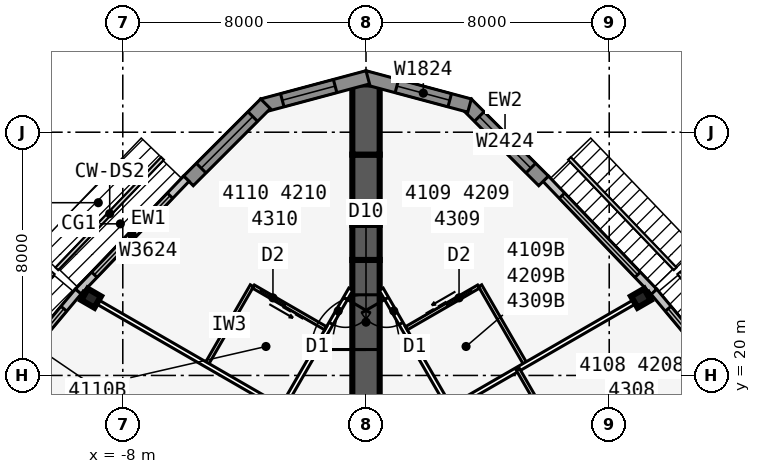
"""IFC4 building model, lengths in metres.
Left out: names, types, materials, properties, quantities, classifications, styles, units other than length and angle.
Written with IfcOpenShell. Run it as: python <this file> out.ifc"""

import sys

from ifc_helpers import new_model, si_unit, direction, frame, frame_2d, origin, origin_2d, place, context, subcontext, project, spatial, polyline, rectangle, i_section, outline, extrude, element, fill, save


model = new_model("IFC4")
c1 = context("Model", 3, precision=1e-05, world=origin(), true_north=direction((0.0, 1.0)))
c2 = subcontext(c1, "Body", "Model", "MODEL_VIEW")
j1 = project(units=[si_unit("LENGTHUNIT", "METRE"), si_unit("PLANEANGLEUNIT", "RADIAN")], contexts=[c1])
p1 = place(None, origin())
s1 = spatial("IfcSite", under=j1, at=p1, CompositionType="ELEMENT")
p2 = place(p1, origin())
s2 = spatial("IfcBuilding", under=s1, at=p2, CompositionType="ELEMENT")
p3 = place(p2, frame((0.0, 0.0, 155.5)))
s3 = spatial("IfcBuildingStorey", under=s2, at=p3, CompositionType="ELEMENT", Elevation=155.5)
p4 = place(p3, frame((0.0, 19.052, 0.0), z_axis=(0.0, 0.0, 1.0), x_axis=(0.0, 1.0, 0.0)))
e1 = element("IfcWall", 1, at=p4, inside=s3, PredefinedType="SHEAR", context=c2, shape_type="SweptSolid", body=[
    extrude(rectangle(XDim=4.746, YDim=0.9, at=frame_2d((2.373, 0.0))), origin(), (0.0, 0.0, 1.0), 3.4),
])
p5 = place(p4, frame((1.8, 0.0, 0.0)))
e2 = element("IfcOpeningElement", 2, at=p5, cuts=e1, PredefinedType="OPENING", context=c2, shape_type="SweptSolid", body=[
    extrude(rectangle(XDim=1.8, YDim=2.13, at=frame_2d((0.9, 1.065))), frame((0.0, 0.46, 0.0), z_axis=(0.0, -1.0, 0.0), x_axis=(1.0, 0.0, 0.0)), (0.0, 0.0, 1.0), 0.92),
])
p6 = place(p3, frame((0.0, 23.799, 0.0), z_axis=(0.0, 0.0, 1.0), x_axis=(0.0, 1.0, 0.0)))
e3 = element("IfcWall", 3, at=p6, inside=s3, PredefinedType="SHEAR", context=c2, shape_type="SweptSolid", body=[
    extrude(rectangle(XDim=1.155, YDim=0.9, at=frame_2d((0.577, 0.0))), origin(), (0.0, 0.0, 1.0), 3.4),
])
p7 = place(p3, frame((0.0, 24.953, 0.0), z_axis=(0.0, 0.0, 1.0), x_axis=(0.0, 1.0, 0.0)))
e4 = element("IfcWall", 4, at=p7, inside=s3, PredefinedType="SHEAR", context=c2, shape_type="SweptSolid", body=[
    extrude(rectangle(XDim=2.309, YDim=0.9, at=frame_2d((1.155, 0.0))), origin(), (0.0, 0.0, 1.0), 3.4),
])
p8 = place(p3, frame((0.0, 27.263, 0.0), z_axis=(0.0, 0.0, 1.0), x_axis=(0.0, 1.0, 0.0)))
e5 = element("IfcWall", 5, at=p8, inside=s3, PredefinedType="SHEAR", context=c2, shape_type="SweptSolid", body=[
    extrude(rectangle(XDim=2.31, YDim=0.9, at=frame_2d((1.155, 0.0))), origin(), (0.0, 0.0, 1.0), 3.4),
])
for number, where, z_axis, x_axis in (
    (6, (9.041, 22.541, 0.0), (0.0, 0.0, 1.0), (-0.5, 0.866, 0.0)),
    (7, (-9.041, 22.541, 0.0), (0.0, 0.0, 1.0), (-0.5, -0.866, 0.0)),
):
    element("IfcColumn", number, at=place(p3, frame(where, z_axis=z_axis, x_axis=x_axis)), inside=s3, PredefinedType="COLUMN", context=c2, shape_type="SweptSolid", body=[
        extrude(i_section(OverallWidth=0.432, OverallDepth=0.498, WebThickness=0.056, FlangeThickness=0.089, at=origin_2d()), origin(), (0.0, 0.0, 1.0), 3.4),
    ])
p9 = place(p3, frame((12.723, 18.868, 0.0), z_axis=(0.0, 0.0, 1.0), x_axis=(-0.641810386606, 0.766863369607, 0.0)))
e8 = element("IfcWall", 8, at=p9, inside=s3, PredefinedType="STANDARD", context=c2, shape_type="SweptSolid", body=[
    extrude(rectangle(XDim=5.076, YDim=0.25, at=frame_2d((2.538, 0.0))), origin(), (0.0, 0.0, 1.0), 3.235),
])
p10 = place(p9, frame((0.738, 0.0, 0.45)))
e9 = element("IfcOpeningElement", 9, at=p10, cuts=e8, PredefinedType="OPENING", context=c2, shape_type="SweptSolid", body=[
    extrude(rectangle(XDim=3.6, YDim=2.4, at=frame_2d((1.8, 1.2))), frame((0.0, 0.135, 0.0), z_axis=(0.0, -1.0, 0.0), x_axis=(1.0, 0.0, 0.0)), (0.0, 0.0, 1.0), 0.27),
])
p11 = place(p3, frame((9.471, 22.754, 0.0), z_axis=(0.0, 0.0, 1.0), x_axis=(-0.691719937936, 0.722165858693, 0.0)))
e10 = element("IfcWall", 10, at=p11, inside=s3, PredefinedType="STANDARD", context=c2, shape_type="SweptSolid", body=[
    extrude(rectangle(XDim=5.148, YDim=0.25, at=frame_2d((2.574, 0.0))), origin(), (0.0, 0.0, 1.0), 3.235),
])
p12 = place(p11, frame((0.774, 0.0, 0.45)))
e11 = element("IfcOpeningElement", 11, at=p12, cuts=e10, PredefinedType="OPENING", context=c2, shape_type="SweptSolid", body=[
    extrude(rectangle(XDim=3.6, YDim=2.4, at=frame_2d((1.8, 1.2))), frame((0.0, 0.135, 0.0), z_axis=(0.0, -1.0, 0.0), x_axis=(1.0, 0.0, 0.0)), (0.0, 0.0, 1.0), 0.27),
])
p13 = place(p3, frame((5.841, 26.399, 0.0), z_axis=(0.0, 0.0, 1.0), x_axis=(-0.707106781187, 0.707106781187, 0.0)))
e12 = element("IfcWall", 12, at=p13, inside=s3, PredefinedType="SOLIDWALL", context=c2, shape_type="SweptSolid", body=[
    extrude(rectangle(XDim=3.586, YDim=0.45, at=frame_2d((1.793, 0.0))), origin(), (0.0, 0.0, 1.0), 3.235),
])
p14 = place(p13, frame((0.593, 0.0, 0.45)))
e13 = element("IfcOpeningElement", 13, at=p14, cuts=e12, PredefinedType="OPENING", context=c2, shape_type="SweptSolid", body=[
    extrude(rectangle(XDim=2.4, YDim=2.4, at=frame_2d((1.2, 1.2))), frame((0.0, 0.235, 0.0), z_axis=(0.0, -1.0, 0.0), x_axis=(1.0, 0.0, 0.0)), (0.0, 0.0, 1.0), 0.47),
])
p15 = place(p3, frame((3.406, 28.877, 0.0), z_axis=(0.0, 0.0, 1.0), x_axis=(-0.965924653531, 0.258823421857, 0.0)))
e14 = element("IfcWall", 14, at=p15, inside=s3, PredefinedType="SOLIDWALL", context=c2, shape_type="SweptSolid", body=[
    extrude(outline(polyline([(3.586, 0.225), (3.527, 0.225), (3.035, 0.093), (3.0, 0.225), (0.0, 0.225), (0.0, -0.225), (3.586, -0.225), (3.586, 0.225)])), origin(), (0.0, 0.0, 1.0), 3.235),
])
p16 = place(p15, frame((0.675, 0.0, 0.45)))
e15 = element("IfcOpeningElement", 15, at=p16, cuts=e14, PredefinedType="OPENING", context=c2, shape_type="SweptSolid", body=[
    extrude(rectangle(XDim=1.8, YDim=2.4, at=frame_2d((0.9, 1.2))), frame((0.0, 0.235, 0.0), z_axis=(0.0, -1.0, 0.0), x_axis=(1.0, 0.0, 0.0)), (0.0, 0.0, 1.0), 0.47),
])
p17 = place(p3, frame((0.058, 29.805, 0.0), z_axis=(0.0, 0.0, 1.0), x_axis=(-0.965924653531, -0.258823421857, 0.0)))
e16 = element("IfcWall", 16, at=p17, inside=s3, PredefinedType="SOLIDWALL", context=c2, shape_type="SweptSolid", body=[
    extrude(outline(polyline([(3.586, 0.225), (0.586, 0.225), (0.551, 0.093), (0.06, 0.225), (0.0, 0.225), (0.0, -0.225), (3.586, -0.225), (3.586, 0.225)])), origin(), (0.0, 0.0, 1.0), 3.235),
])
p18 = place(p17, frame((1.111, 0.0, 0.45)))
e17 = element("IfcOpeningElement", 17, at=p18, cuts=e16, PredefinedType="OPENING", context=c2, shape_type="SweptSolid", body=[
    extrude(rectangle(XDim=1.8, YDim=2.4, at=frame_2d((0.9, 1.2))), frame((0.0, 0.235, 0.0), z_axis=(0.0, -1.0, 0.0), x_axis=(1.0, 0.0, 0.0)), (0.0, 0.0, 1.0), 0.47),
])
p19 = place(p3, frame((-3.305, 28.935, 0.0), z_axis=(0.0, 0.0, 1.0), x_axis=(-0.707106781187, -0.707106781187, 0.0)))
e18 = element("IfcWall", 18, at=p19, inside=s3, PredefinedType="SOLIDWALL", context=c2, shape_type="SweptSolid", body=[
    extrude(rectangle(XDim=3.586, YDim=0.45, at=frame_2d((1.793, 0.0))), origin(), (0.0, 0.0, 1.0), 3.235),
])
p20 = place(p19, frame((0.593, 0.0, 0.45)))
e19 = element("IfcOpeningElement", 19, at=p20, cuts=e18, PredefinedType="OPENING", context=c2, shape_type="SweptSolid", body=[
    extrude(rectangle(XDim=2.4, YDim=2.4, at=frame_2d((1.2, 1.2))), frame((0.0, 0.235, 0.0), z_axis=(0.0, -1.0, 0.0), x_axis=(1.0, 0.0, 0.0)), (0.0, 0.0, 1.0), 0.47),
])
p21 = place(p3, frame((-5.91, 26.472, 0.0), z_axis=(0.0, 0.0, 1.0), x_axis=(-0.691719937936, -0.722165858693, 0.0)))
e20 = element("IfcWall", 20, at=p21, inside=s3, PredefinedType="STANDARD", context=c2, shape_type="SweptSolid", body=[
    extrude(rectangle(XDim=5.148, YDim=0.25, at=frame_2d((2.574, 0.0))), origin(), (0.0, 0.0, 1.0), 3.235),
])
p22 = place(p21, frame((0.774, 0.0, 0.45)))
e21 = element("IfcOpeningElement", 21, at=p22, cuts=e20, PredefinedType="OPENING", context=c2, shape_type="SweptSolid", body=[
    extrude(rectangle(XDim=3.6, YDim=2.4, at=frame_2d((1.8, 1.2))), frame((0.0, 0.135, 0.0), z_axis=(0.0, -1.0, 0.0), x_axis=(1.0, 0.0, 0.0)), (0.0, 0.0, 1.0), 0.27),
])
p23 = place(p3, frame((-9.465, 22.76, 0.0), z_axis=(0.0, 0.0, 1.0), x_axis=(-0.641810386606, -0.766863369607, 0.0)))
e22 = element("IfcWall", 22, at=p23, inside=s3, PredefinedType="STANDARD", context=c2, shape_type="SweptSolid", body=[
    extrude(rectangle(XDim=5.076, YDim=0.25, at=frame_2d((2.538, 0.0))), origin(), (0.0, 0.0, 1.0), 3.235),
])
p24 = place(p23, frame((0.738, 0.0, 0.45)))
e23 = element("IfcOpeningElement", 23, at=p24, cuts=e22, PredefinedType="OPENING", context=c2, shape_type="SweptSolid", body=[
    extrude(rectangle(XDim=3.6, YDim=2.4, at=frame_2d((1.8, 1.2))), frame((0.0, 0.135, 0.0), z_axis=(0.0, -1.0, 0.0), x_axis=(1.0, 0.0, 0.0)), (0.0, 0.0, 1.0), 0.27),
])
p25 = place(p3, frame((20.027, -10.985, 0.0), z_axis=(0.0, 0.0, 1.0), x_axis=(-0.500001677587, 0.866024435227, 0.0)))
e24 = element("IfcWall", 24, at=p25, inside=s3, PredefinedType="PARTITIONING", context=c2, shape_type="SweptSolid", body=[
    extrude(rectangle(XDim=39.054, YDim=0.15, at=frame_2d((19.527, 0.0))), origin(), (0.0, 0.0, 1.0), 3.235),
])
p26 = place(p25, frame((1.558, 0.0, 0.0)))
e25 = element("IfcOpeningElement", 25, at=p26, cuts=e24, PredefinedType="OPENING", context=c2, shape_type="SweptSolid", body=[
    extrude(rectangle(XDim=0.95, YDim=2.13, at=frame_2d((0.475, 1.065))), frame((0.0, 0.085, 0.0), z_axis=(0.0, -1.0, 0.0), x_axis=(1.0, 0.0, 0.0)), (0.0, 0.0, 1.0), 0.17),
])
p27 = place(p25, frame((15.352, 0.0, 0.0)))
e26 = element("IfcOpeningElement", 26, at=p27, cuts=e24, PredefinedType="OPENING", context=c2, shape_type="SweptSolid", body=[
    extrude(rectangle(XDim=0.95, YDim=2.13, at=frame_2d((0.475, 1.065))), frame((0.0, 0.085, 0.0), z_axis=(0.0, -1.0, 0.0), x_axis=(1.0, 0.0, 0.0)), (0.0, 0.0, 1.0), 0.17),
])
p28 = place(p25, frame((22.752, 0.0, 0.0)))
e27 = element("IfcOpeningElement", 27, at=p28, cuts=e24, PredefinedType="OPENING", context=c2, shape_type="SweptSolid", body=[
    extrude(rectangle(XDim=0.95, YDim=2.13, at=frame_2d((0.475, 1.065))), frame((0.0, 0.085, 0.0), z_axis=(0.0, -1.0, 0.0), x_axis=(1.0, 0.0, 0.0)), (0.0, 0.0, 1.0), 0.17),
])
p29 = place(p25, frame((30.952, 0.0, 0.0)))
e28 = element("IfcOpeningElement", 28, at=p29, cuts=e24, PredefinedType="OPENING", context=c2, shape_type="SweptSolid", body=[
    extrude(rectangle(XDim=0.95, YDim=2.13, at=frame_2d((0.475, 1.065))), frame((0.0, 0.085, 0.0), z_axis=(0.0, -1.0, 0.0), x_axis=(1.0, 0.0, 0.0)), (0.0, 0.0, 1.0), 0.17),
])
p30 = place(p25, frame((37.752, 0.0, 0.0)))
e29 = element("IfcOpeningElement", 29, at=p30, cuts=e24, PredefinedType="OPENING", context=c2, shape_type="SweptSolid", body=[
    extrude(rectangle(XDim=0.95, YDim=2.13, at=frame_2d((0.475, 1.065))), frame((0.0, 0.085, 0.0), z_axis=(0.0, -1.0, 0.0), x_axis=(1.0, 0.0, 0.0)), (0.0, 0.0, 1.0), 0.17),
])
p31 = place(p3, frame((2.829, 18.954, 0.0), z_axis=(0.0, 0.0, 1.0), x_axis=(0.866015739374, 0.500016738876, 0.0)))
e30 = element("IfcWall", 30, at=p31, inside=s3, PredefinedType="PARTITIONING", context=c2, shape_type="SweptSolid", body=[
    extrude(rectangle(XDim=7.516, YDim=0.15, at=frame_2d((3.758, 0.0))), origin(), (0.0, 0.0, 1.0), 2.389),
])
p32 = place(p3, frame((6.194, 18.125, 0.0), z_axis=(0.0, 0.0, 1.0), x_axis=(-0.500033551112, 0.866006032174, 0.0)))
e31 = element("IfcWall", 31, at=p32, inside=s3, PredefinedType="PLUMBINGWALL", context=c2, shape_type="SweptSolid", body=[
    extrude(rectangle(XDim=2.4, YDim=0.12, at=frame_2d((1.2, 0.0))), origin(), (0.0, 0.0, 1.0), 3.235),
])
p33 = place(p3, frame((5.253, 20.354, 0.0), z_axis=(0.0, 0.0, 1.0), x_axis=(-0.499990139034, 0.866031096941, 0.0)))
e32 = element("IfcWall", 32, at=p33, inside=s3, PredefinedType="PLUMBINGWALL", context=c2, shape_type="SweptSolid", body=[
    extrude(rectangle(XDim=3.0, YDim=0.12, at=frame_2d((1.5, 0.0))), origin(), (0.0, 0.0, 1.0), 3.235),
])
p34 = place(p3, frame((1.329, 21.552, 0.0), z_axis=(0.0, 0.0, 1.0), x_axis=(0.865997131366, 0.500048966069, 0.0)))
e33 = element("IfcWall", 33, at=p34, inside=s3, PredefinedType="PLUMBINGWALL", context=c2, shape_type="SweptSolid", body=[
    extrude(rectangle(XDim=2.74, YDim=0.12, at=frame_2d((1.37, 0.0))), origin(), (0.0, 0.0, 1.0), 3.235),
])
p35 = place(p34, frame((1.55, 0.0, 0.0)))
e34 = element("IfcOpeningElement", 34, at=p35, cuts=e33, PredefinedType="OPENING", context=c2, shape_type="SweptSolid", body=[
    extrude(rectangle(XDim=0.9, YDim=2.13, at=frame_2d((0.45, 1.065))), frame((0.0, 0.07, 0.0), z_axis=(0.0, -1.0, 0.0), x_axis=(1.0, 0.0, 0.0)), (0.0, 0.0, 1.0), 0.14),
])
p36 = place(p3, frame((-0.5, 22.836, 0.0), z_axis=(0.0, 0.0, 1.0), x_axis=(-0.500001677587, -0.866024435227, 0.0)))
e35 = element("IfcWall", 35, at=p36, inside=s3, PredefinedType="PARTITIONING", context=c2, shape_type="SweptSolid", body=[
    extrude(rectangle(XDim=39.054, YDim=0.15, at=frame_2d((19.527, 0.0))), origin(), (0.0, 0.0, 1.0), 3.235),
])
p37 = place(p36, frame((0.352, 0.0, 0.0)))
e36 = element("IfcOpeningElement", 36, at=p37, cuts=e35, PredefinedType="OPENING", context=c2, shape_type="SweptSolid", body=[
    extrude(rectangle(XDim=0.95, YDim=2.13, at=frame_2d((0.475, 1.065))), frame((0.0, 0.085, 0.0), z_axis=(0.0, -1.0, 0.0), x_axis=(1.0, 0.0, 0.0)), (0.0, 0.0, 1.0), 0.17),
])
p38 = place(p36, frame((5.952, 0.0, 0.0)))
e37 = element("IfcOpeningElement", 37, at=p38, cuts=e35, PredefinedType="OPENING", context=c2, shape_type="SweptSolid", body=[
    extrude(rectangle(XDim=0.95, YDim=2.13, at=frame_2d((0.475, 1.065))), frame((0.0, 0.085, 0.0), z_axis=(0.0, -1.0, 0.0), x_axis=(1.0, 0.0, 0.0)), (0.0, 0.0, 1.0), 0.17),
])
p39 = place(p36, frame((12.752, 0.0, 0.0)))
e38 = element("IfcOpeningElement", 38, at=p39, cuts=e35, PredefinedType="OPENING", context=c2, shape_type="SweptSolid", body=[
    extrude(rectangle(XDim=0.95, YDim=2.13, at=frame_2d((0.475, 1.065))), frame((0.0, 0.085, 0.0), z_axis=(0.0, -1.0, 0.0), x_axis=(1.0, 0.0, 0.0)), (0.0, 0.0, 1.0), 0.17),
])
p40 = place(p36, frame((25.352, 0.0, 0.0)))
e39 = element("IfcOpeningElement", 39, at=p40, cuts=e35, PredefinedType="OPENING", context=c2, shape_type="SweptSolid", body=[
    extrude(rectangle(XDim=0.95, YDim=2.13, at=frame_2d((0.475, 1.065))), frame((0.0, 0.085, 0.0), z_axis=(0.0, -1.0, 0.0), x_axis=(1.0, 0.0, 0.0)), (0.0, 0.0, 1.0), 0.17),
])
p41 = place(p36, frame((32.152, 0.0, 0.0)))
e40 = element("IfcOpeningElement", 40, at=p41, cuts=e35, PredefinedType="OPENING", context=c2, shape_type="SweptSolid", body=[
    extrude(rectangle(XDim=0.95, YDim=2.13, at=frame_2d((0.475, 1.065))), frame((0.0, 0.085, 0.0), z_axis=(0.0, -1.0, 0.0), x_axis=(1.0, 0.0, 0.0)), (0.0, 0.0, 1.0), 0.17),
])
p42 = place(p36, frame((37.752, 0.0, 0.0)))
e41 = element("IfcOpeningElement", 41, at=p42, cuts=e35, PredefinedType="OPENING", context=c2, shape_type="SweptSolid", body=[
    extrude(rectangle(XDim=0.95, YDim=2.13, at=frame_2d((0.475, 1.065))), frame((0.0, 0.085, 0.0), z_axis=(0.0, -1.0, 0.0), x_axis=(1.0, 0.0, 0.0)), (0.0, 0.0, 1.0), 0.17),
])
p43 = place(p3, frame((-2.829, 18.954, 0.0), z_axis=(0.0, 0.0, 1.0), x_axis=(-0.866015739374, 0.500016738876, 0.0)))
e42 = element("IfcWall", 42, at=p43, inside=s3, PredefinedType="PARTITIONING", context=c2, shape_type="SweptSolid", body=[
    extrude(rectangle(XDim=7.516, YDim=0.15, at=frame_2d((3.758, 0.0))), origin(), (0.0, 0.0, 1.0), 2.389),
])
p44 = place(p3, frame((-3.753, 22.952, 0.0), z_axis=(0.0, 0.0, 1.0), x_axis=(-0.499990139034, -0.866031096941, 0.0)))
e43 = element("IfcWall", 43, at=p44, inside=s3, PredefinedType="PLUMBINGWALL", context=c2, shape_type="SweptSolid", body=[
    extrude(rectangle(XDim=3.0, YDim=0.12, at=frame_2d((1.5, 0.0))), origin(), (0.0, 0.0, 1.0), 3.235),
])
p45 = place(p3, frame((-1.329, 21.552, 0.0), z_axis=(0.0, 0.0, 1.0), x_axis=(-0.865997131366, 0.500048966069, 0.0)))
e44 = element("IfcWall", 44, at=p45, inside=s3, PredefinedType="PLUMBINGWALL", context=c2, shape_type="SweptSolid", body=[
    extrude(rectangle(XDim=2.74, YDim=0.12, at=frame_2d((1.37, 0.0))), origin(), (0.0, 0.0, 1.0), 3.235),
])
p46 = place(p45, frame((1.55, 0.0, 0.0)))
e45 = element("IfcOpeningElement", 45, at=p46, cuts=e44, PredefinedType="OPENING", context=c2, shape_type="SweptSolid", body=[
    extrude(rectangle(XDim=0.9, YDim=2.13, at=frame_2d((0.45, 1.065))), frame((0.0, 0.07, 0.0), z_axis=(0.0, -1.0, 0.0), x_axis=(1.0, 0.0, 0.0)), (0.0, 0.0, 1.0), 0.14),
])
p47 = place(p10, origin())
e46 = element("IfcWindow", 46, at=p47, inside=s3, PartitioningType="SINGLE_PANEL", PredefinedType="WINDOW", context=c2, shape_type="SweptSolid", body=[
    extrude(rectangle(XDim=3.6, YDim=2.4, at=frame_2d((1.8, 1.2))), frame((0.0, 0.03, 0.0), z_axis=(0.0, -1.0, 0.0), x_axis=(1.0, 0.0, 0.0)), (0.0, 0.0, 1.0), 0.06),
])
fill(e9, e46)
p48 = place(p12, origin())
e47 = element("IfcWindow", 47, at=p48, inside=s3, PartitioningType="SINGLE_PANEL", PredefinedType="WINDOW", context=c2, shape_type="SweptSolid", body=[
    extrude(rectangle(XDim=3.6, YDim=2.4, at=frame_2d((1.8, 1.2))), frame((0.0, 0.03, 0.0), z_axis=(0.0, -1.0, 0.0), x_axis=(1.0, 0.0, 0.0)), (0.0, 0.0, 1.0), 0.06),
])
fill(e11, e47)
p49 = place(p14, origin())
e48 = element("IfcWindow", 48, at=p49, inside=s3, PartitioningType="SINGLE_PANEL", PredefinedType="WINDOW", context=c2, shape_type="SweptSolid", body=[
    extrude(rectangle(XDim=2.4, YDim=2.4, at=frame_2d((1.2, 1.2))), frame((0.0, 0.03, 0.0), z_axis=(0.0, -1.0, 0.0), x_axis=(1.0, 0.0, 0.0)), (0.0, 0.0, 1.0), 0.06),
])
fill(e13, e48)
p50 = place(p16, origin())
e49 = element("IfcWindow", 49, at=p50, inside=s3, PartitioningType="SINGLE_PANEL", PredefinedType="WINDOW", context=c2, shape_type="SweptSolid", body=[
    extrude(rectangle(XDim=1.8, YDim=2.4, at=frame_2d((0.9, 1.2))), frame((0.0, 0.03, 0.0), z_axis=(0.0, -1.0, 0.0), x_axis=(1.0, 0.0, 0.0)), (0.0, 0.0, 1.0), 0.06),
])
fill(e15, e49)
p51 = place(p18, origin())
e50 = element("IfcWindow", 50, at=p51, inside=s3, PartitioningType="SINGLE_PANEL", PredefinedType="WINDOW", context=c2, shape_type="SweptSolid", body=[
    extrude(rectangle(XDim=1.8, YDim=2.4, at=frame_2d((0.9, 1.2))), frame((0.0, 0.03, 0.0), z_axis=(0.0, -1.0, 0.0), x_axis=(1.0, 0.0, 0.0)), (0.0, 0.0, 1.0), 0.06),
])
fill(e17, e50)
p52 = place(p20, origin())
e51 = element("IfcWindow", 51, at=p52, inside=s3, PartitioningType="SINGLE_PANEL", PredefinedType="WINDOW", context=c2, shape_type="SweptSolid", body=[
    extrude(rectangle(XDim=2.4, YDim=2.4, at=frame_2d((1.2, 1.2))), frame((0.0, 0.03, 0.0), z_axis=(0.0, -1.0, 0.0), x_axis=(1.0, 0.0, 0.0)), (0.0, 0.0, 1.0), 0.06),
])
fill(e19, e51)
p53 = place(p22, origin())
e52 = element("IfcWindow", 52, at=p53, inside=s3, PartitioningType="SINGLE_PANEL", PredefinedType="WINDOW", context=c2, shape_type="SweptSolid", body=[
    extrude(rectangle(XDim=3.6, YDim=2.4, at=frame_2d((1.8, 1.2))), frame((0.0, 0.03, 0.0), z_axis=(0.0, -1.0, 0.0), x_axis=(1.0, 0.0, 0.0)), (0.0, 0.0, 1.0), 0.06),
])
fill(e21, e52)
p54 = place(p24, origin())
e53 = element("IfcWindow", 53, at=p54, inside=s3, PartitioningType="SINGLE_PANEL", PredefinedType="WINDOW", context=c2, shape_type="SweptSolid", body=[
    extrude(rectangle(XDim=3.6, YDim=2.4, at=frame_2d((1.8, 1.2))), frame((0.0, 0.03, 0.0), z_axis=(0.0, -1.0, 0.0), x_axis=(1.0, 0.0, 0.0)), (0.0, 0.0, 1.0), 0.06),
])
fill(e23, e53)
p55 = place(p35, origin())
e54 = element("IfcDoor", 54, at=p55, inside=s3, OperationType="SLIDING_TO_LEFT", PredefinedType="DOOR", context=c2, shape_type="SweptSolid", body=[
    extrude(rectangle(XDim=0.9, YDim=2.13, at=frame_2d((0.45, 1.065))), frame((0.0, 0.025, 0.0), z_axis=(0.0, -1.0, 0.0), x_axis=(1.0, 0.0, 0.0)), (0.0, 0.0, 1.0), 0.05),
])
fill(e34, e54)
p56 = place(p30, origin())
e55 = element("IfcDoor", 55, at=p56, inside=s3, OperationType="SINGLE_SWING_RIGHT", PredefinedType="DOOR", context=c2, shape_type="SweptSolid", body=[
    extrude(rectangle(XDim=0.95, YDim=2.13, at=frame_2d((0.475, 1.065))), frame((0.0, 0.025, 0.0), z_axis=(0.0, -1.0, 0.0), x_axis=(1.0, 0.0, 0.0)), (0.0, 0.0, 1.0), 0.05),
])
fill(e29, e55)
p57 = place(p46, origin())
e56 = element("IfcDoor", 56, at=p57, inside=s3, OperationType="SLIDING_TO_LEFT", PredefinedType="DOOR", context=c2, shape_type="SweptSolid", body=[
    extrude(rectangle(XDim=0.9, YDim=2.13, at=frame_2d((0.45, 1.065))), frame((0.0, 0.025, 0.0), z_axis=(0.0, -1.0, 0.0), x_axis=(1.0, 0.0, 0.0)), (0.0, 0.0, 1.0), 0.05),
])
fill(e45, e56)
p58 = place(p37, origin())
e57 = element("IfcDoor", 57, at=p58, inside=s3, OperationType="SINGLE_SWING_LEFT", PredefinedType="DOOR", context=c2, shape_type="SweptSolid", body=[
    extrude(rectangle(XDim=0.95, YDim=2.13, at=frame_2d((0.475, 1.065))), frame((0.0, 0.025, 0.0), z_axis=(0.0, -1.0, 0.0), x_axis=(1.0, 0.0, 0.0)), (0.0, 0.0, 1.0), 0.05),
])
fill(e36, e57)
p59 = place(p5, origin())
e58 = element("IfcDoor", 58, at=p59, inside=s3, OperationType="DOUBLE_DOOR_DOUBLE_SWING", PredefinedType="DOOR", context=c2, shape_type="SweptSolid", body=[
    extrude(rectangle(XDim=1.8, YDim=2.13, at=frame_2d((0.9, 1.065))), frame((0.0, 0.025, 0.0), z_axis=(0.0, -1.0, 0.0), x_axis=(1.0, 0.0, 0.0)), (0.0, 0.0, 1.0), 0.05),
])
fill(e2, e58)
save(model, sys.argv[1])
